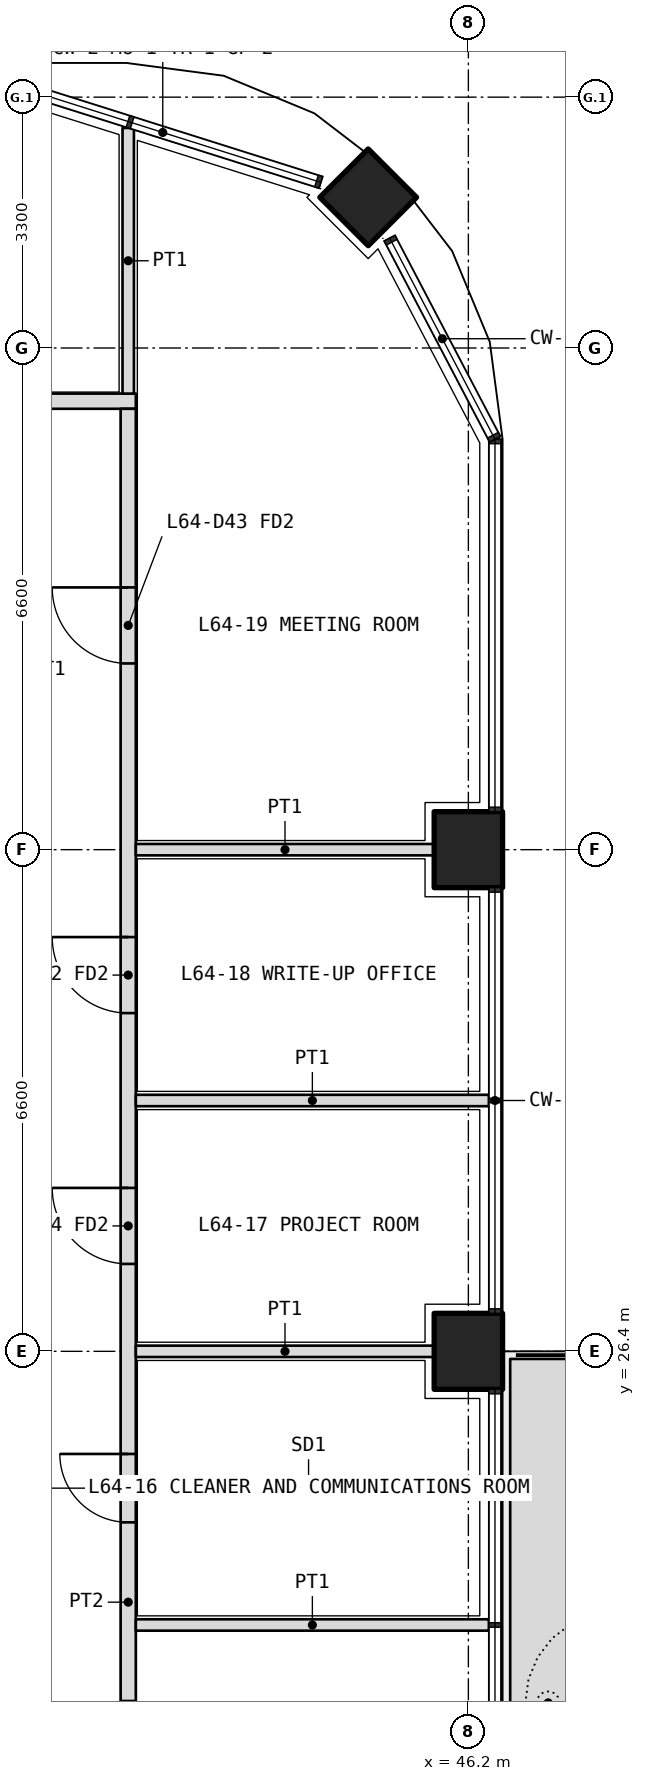
"""IFC4 building model, lengths in metres.
Left out: names, types, materials, properties, quantities, classifications, styles, units other than length and angle.
Written with IfcOpenShell. Run it as: python <this file> out.ifc"""

import sys

from ifc_helpers import new_model, si_unit, direction, frame, frame_2d, origin, origin_2d, place, context, subcontext, project, spatial, polyline, rectangle, outline, extrude, element, fill, save


model = new_model("IFC4")
c1 = context("Model", 3, precision=1e-05, world=origin(), true_north=direction((0.0, 1.0)))
c2 = subcontext(c1, "Body", "Model", "MODEL_VIEW")
j1 = project(units=[si_unit("LENGTHUNIT", "METRE"), si_unit("PLANEANGLEUNIT", "RADIAN")], contexts=[c1])
p1 = place(None, origin())
s1 = spatial("IfcSite", under=j1, at=p1, CompositionType="ELEMENT")
p2 = place(p1, origin())
s2 = spatial("IfcBuilding", under=s1, at=p2, CompositionType="ELEMENT")
p3 = place(p2, frame((0.0, 0.0, 279.6)))
s3 = spatial("IfcBuildingStorey", under=s2, at=p3, CompositionType="ELEMENT", Elevation=279.6)
p4 = place(p3, frame((44.882, 41.582, 0.0), z_axis=(0.0, 0.0, 1.0), x_axis=(0.707106781187, 0.707106781187, 0.0)))
e1 = element("IfcColumn", 1, at=p4, inside=s3, PredefinedType="COLUMN", context=c2, shape_type="SweptSolid", body=[
    extrude(rectangle(XDim=0.9, YDim=0.9, at=origin_2d()), origin(), (0.0, 0.0, 1.0), 4.2),
])
for number, where, z_axis, x_axis in (
    (2, (46.2, 26.4, 0.0), (0.0, 0.0, 1.0), (0.0, 1.0, 0.0)),
    (3, (46.2, 33.0, 0.0), (0.0, 0.0, 1.0), (0.0, 1.0, 0.0)),
):
    element("IfcColumn", number, at=place(p3, frame(where, z_axis=z_axis, x_axis=x_axis)), inside=s3, PredefinedType="COLUMN", context=c2, shape_type="SweptSolid", body=[
        extrude(rectangle(XDim=1.0, YDim=0.9, at=origin_2d()), origin(), (0.0, 0.0, 1.0), 4.2),
    ])
p5 = place(p3, origin())
e4 = element("IfcWall", 4, at=p5, inside=s3, PredefinedType="USERDEFINED", context=c2, shape_type="SweptSolid", body=[
    extrude(outline(polyline([(46.75, 17.25), (47.75, 17.25), (47.75, 26.3), (46.75, 26.3), (46.75, 17.25)]), holes=[polyline([(46.9, 17.4), (47.6, 17.4), (47.6, 26.15), (46.9, 26.15), (46.9, 17.4)])]), origin(), (0.0, 0.0, 1.0), 1.05),
])
p6 = place(p3, frame((10.975, 38.9, 0.0), z_axis=(0.0, 0.0, 1.0), x_axis=(1.0, 0.0, 0.0)))
e5 = element("IfcWall", 5, at=p6, inside=s3, PredefinedType="PARTITIONING", context=c2, shape_type="SweptSolid", body=[
    extrude(rectangle(XDim=30.85, YDim=0.2, at=frame_2d((15.425, 0.0))), origin(), (0.0, 0.0, 1.0), 3.0),
])
p7 = place(p6, frame((2.312, 0.0, 0.0)))
e6 = element("IfcOpeningElement", 6, at=p7, cuts=e5, PredefinedType="OPENING", context=c2, shape_type="SweptSolid", body=[
    extrude(rectangle(XDim=1.0, YDim=2.1, at=frame_2d((0.5, 1.05))), frame((0.0, 0.11, 0.0), z_axis=(0.0, -1.0, 0.0), x_axis=(1.0, 0.0, 0.0)), (0.0, 0.0, 1.0), 0.22),
])
p8 = place(p6, frame((7.125, 0.0, 0.0)))
e7 = element("IfcOpeningElement", 7, at=p8, cuts=e5, PredefinedType="OPENING", context=c2, shape_type="SweptSolid", body=[
    extrude(rectangle(XDim=1.0, YDim=2.1, at=frame_2d((0.5, 1.05))), frame((0.0, 0.11, 0.0), z_axis=(0.0, -1.0, 0.0), x_axis=(1.0, 0.0, 0.0)), (0.0, 0.0, 1.0), 0.22),
])
p9 = place(p6, frame((10.425, 0.0, 0.0)))
e8 = element("IfcOpeningElement", 8, at=p9, cuts=e5, PredefinedType="OPENING", context=c2, shape_type="SweptSolid", body=[
    extrude(rectangle(XDim=1.0, YDim=2.1, at=frame_2d((0.5, 1.05))), frame((0.0, 0.11, 0.0), z_axis=(0.0, -1.0, 0.0), x_axis=(1.0, 0.0, 0.0)), (0.0, 0.0, 1.0), 0.22),
])
p10 = place(p6, frame((13.275, 0.0, 0.0)))
e9 = element("IfcOpeningElement", 9, at=p10, cuts=e5, PredefinedType="OPENING", context=c2, shape_type="SweptSolid", body=[
    extrude(rectangle(XDim=1.0, YDim=2.1, at=frame_2d((0.5, 1.05))), frame((0.0, 0.11, 0.0), z_axis=(0.0, -1.0, 0.0), x_axis=(1.0, 0.0, 0.0)), (0.0, 0.0, 1.0), 0.22),
])
p11 = place(p6, frame((22.587, 0.0, 0.0)))
e10 = element("IfcOpeningElement", 10, at=p11, cuts=e5, PredefinedType="OPENING", context=c2, shape_type="SweptSolid", body=[
    extrude(rectangle(XDim=1.0, YDim=2.1, at=frame_2d((0.5, 1.05))), frame((0.0, 0.11, 0.0), z_axis=(0.0, -1.0, 0.0), x_axis=(1.0, 0.0, 0.0)), (0.0, 0.0, 1.0), 0.22),
])
p12 = place(p3, frame((41.725, 7.4, 0.0), z_axis=(0.0, 0.0, 1.0), x_axis=(0.0, 1.0, 0.0)))
e11 = element("IfcWall", 11, at=p12, inside=s3, PredefinedType="PARTITIONING", context=c2, shape_type="SweptSolid", body=[
    extrude(rectangle(XDim=31.4, YDim=0.2, at=frame_2d((15.7, 0.0))), origin(), (0.0, 0.0, 1.0), 3.0),
])
p13 = place(p12, frame((3.9, 0.0, 0.0)))
e12 = element("IfcOpeningElement", 12, at=p13, cuts=e11, PredefinedType="OPENING", context=c2, shape_type="SweptSolid", body=[
    extrude(rectangle(XDim=1.2, YDim=2.1, at=frame_2d((0.6, 1.05))), frame((0.0, 0.11, 0.0), z_axis=(0.0, -1.0, 0.0), x_axis=(1.0, 0.0, 0.0)), (0.0, 0.0, 1.0), 0.22),
])
p14 = place(p12, frame((10.25, 0.0, 0.0)))
e13 = element("IfcOpeningElement", 13, at=p14, cuts=e11, PredefinedType="OPENING", context=c2, shape_type="SweptSolid", body=[
    extrude(rectangle(XDim=1.0, YDim=2.1, at=frame_2d((0.5, 1.05))), frame((0.0, 0.11, 0.0), z_axis=(0.0, -1.0, 0.0), x_axis=(1.0, 0.0, 0.0)), (0.0, 0.0, 1.0), 0.22),
])
p15 = place(p12, frame((13.4, 0.0, 0.0)))
e14 = element("IfcOpeningElement", 14, at=p15, cuts=e11, PredefinedType="OPENING", context=c2, shape_type="SweptSolid", body=[
    extrude(rectangle(XDim=1.0, YDim=2.1, at=frame_2d((0.5, 1.05))), frame((0.0, 0.11, 0.0), z_axis=(0.0, -1.0, 0.0), x_axis=(1.0, 0.0, 0.0)), (0.0, 0.0, 1.0), 0.22),
])
p16 = place(p12, frame((16.75, 0.0, 0.0)))
e15 = element("IfcOpeningElement", 15, at=p16, cuts=e11, PredefinedType="OPENING", context=c2, shape_type="SweptSolid", body=[
    extrude(rectangle(XDim=0.9, YDim=2.1, at=frame_2d((0.45, 1.05))), frame((0.0, 0.11, 0.0), z_axis=(0.0, -1.0, 0.0), x_axis=(1.0, 0.0, 0.0)), (0.0, 0.0, 1.0), 0.22),
])
p17 = place(p12, frame((20.15, 0.0, 0.0)))
e16 = element("IfcOpeningElement", 16, at=p17, cuts=e11, PredefinedType="OPENING", context=c2, shape_type="SweptSolid", body=[
    extrude(rectangle(XDim=1.0, YDim=2.1, at=frame_2d((0.5, 1.05))), frame((0.0, 0.11, 0.0), z_axis=(0.0, -1.0, 0.0), x_axis=(1.0, 0.0, 0.0)), (0.0, 0.0, 1.0), 0.22),
])
p18 = place(p12, frame((23.45, 0.0, 0.0)))
e17 = element("IfcOpeningElement", 17, at=p18, cuts=e11, PredefinedType="OPENING", context=c2, shape_type="SweptSolid", body=[
    extrude(rectangle(XDim=1.0, YDim=2.1, at=frame_2d((0.5, 1.05))), frame((0.0, 0.11, 0.0), z_axis=(0.0, -1.0, 0.0), x_axis=(1.0, 0.0, 0.0)), (0.0, 0.0, 1.0), 0.22),
])
p19 = place(p12, frame((28.05, 0.0, 0.0)))
e18 = element("IfcOpeningElement", 18, at=p19, cuts=e11, PredefinedType="OPENING", context=c2, shape_type="SweptSolid", body=[
    extrude(rectangle(XDim=1.0, YDim=2.1, at=frame_2d((0.5, 1.05))), frame((0.0, 0.11, 0.0), z_axis=(0.0, -1.0, 0.0), x_axis=(1.0, 0.0, 0.0)), (0.0, 0.0, 1.0), 0.22),
])
p20 = place(p3, frame((41.725, 42.495, 0.0), z_axis=(0.0, 0.0, 1.0), x_axis=(0.0, -1.0, 0.0)))
e19 = element("IfcWall", 19, at=p20, inside=s3, PredefinedType="PARTITIONING", context=c2, shape_type="SweptSolid", body=[
    extrude(rectangle(XDim=3.495, YDim=0.15, at=frame_2d((1.748, 0.0))), origin(), (0.0, 0.0, 1.0), 2.7),
])
p21 = place(p3, frame((46.47, 22.8, 0.0), z_axis=(0.0, 0.0, 1.0), x_axis=(-1.0, 0.0, 0.0)))
e20 = element("IfcWall", 20, at=p21, inside=s3, PredefinedType="PARTITIONING", context=c2, shape_type="SweptSolid", body=[
    extrude(rectangle(XDim=4.645, YDim=0.15, at=frame_2d((2.323, 0.0))), origin(), (0.0, 0.0, 1.0), 2.7),
])
p22 = place(p3, frame((45.75, 26.4, 0.0), z_axis=(0.0, 0.0, 1.0), x_axis=(-1.0, 0.0, 0.0)))
e21 = element("IfcWall", 21, at=p22, inside=s3, PredefinedType="PARTITIONING", context=c2, shape_type="SweptSolid", body=[
    extrude(rectangle(XDim=3.925, YDim=0.15, at=frame_2d((1.962, 0.0))), origin(), (0.0, 0.0, 1.0), 3.0),
])
p23 = place(p3, frame((46.47, 29.7, 0.0), z_axis=(0.0, 0.0, 1.0), x_axis=(-1.0, 0.0, 0.0)))
e22 = element("IfcWall", 22, at=p23, inside=s3, PredefinedType="PARTITIONING", context=c2, shape_type="SweptSolid", body=[
    extrude(rectangle(XDim=4.645, YDim=0.15, at=frame_2d((2.323, 0.0))), origin(), (0.0, 0.0, 1.0), 2.7),
])
p24 = place(p3, frame((45.75, 33.0, 0.0), z_axis=(0.0, 0.0, 1.0), x_axis=(-1.0, 0.0, 0.0)))
e23 = element("IfcWall", 23, at=p24, inside=s3, PredefinedType="PARTITIONING", context=c2, shape_type="SweptSolid", body=[
    extrude(rectangle(XDim=3.925, YDim=0.15, at=frame_2d((1.962, 0.0))), origin(), (0.0, 0.0, 1.0), 3.0),
])
p25 = place(p16, origin())
e24 = element("IfcDoor", 24, at=p25, inside=s3, OperationType="SINGLE_SWING_RIGHT", PredefinedType="DOOR", context=c2, shape_type="SweptSolid", body=[
    extrude(rectangle(XDim=0.9, YDim=2.1, at=frame_2d((0.45, 1.05))), frame((0.0, 0.025, 0.0), z_axis=(0.0, -1.0, 0.0), x_axis=(1.0, 0.0, 0.0)), (0.0, 0.0, 1.0), 0.05),
])
fill(e15, e24)
p26 = place(p17, origin())
e25 = element("IfcDoor", 25, at=p26, inside=s3, OperationType="SINGLE_SWING_RIGHT", PredefinedType="DOOR", context=c2, shape_type="SweptSolid", body=[
    extrude(rectangle(XDim=1.0, YDim=2.1, at=frame_2d((0.5, 1.05))), frame((0.0, 0.025, 0.0), z_axis=(0.0, -1.0, 0.0), x_axis=(1.0, 0.0, 0.0)), (0.0, 0.0, 1.0), 0.05),
])
fill(e16, e25)
p27 = place(p18, origin())
e26 = element("IfcDoor", 26, at=p27, inside=s3, OperationType="SINGLE_SWING_RIGHT", PredefinedType="DOOR", context=c2, shape_type="SweptSolid", body=[
    extrude(rectangle(XDim=1.0, YDim=2.1, at=frame_2d((0.5, 1.05))), frame((0.0, 0.025, 0.0), z_axis=(0.0, -1.0, 0.0), x_axis=(1.0, 0.0, 0.0)), (0.0, 0.0, 1.0), 0.05),
])
fill(e17, e26)
p28 = place(p19, origin())
e27 = element("IfcDoor", 27, at=p28, inside=s3, OperationType="SINGLE_SWING_RIGHT", PredefinedType="DOOR", context=c2, shape_type="SweptSolid", body=[
    extrude(rectangle(XDim=1.0, YDim=2.1, at=frame_2d((0.5, 1.05))), frame((0.0, 0.025, 0.0), z_axis=(0.0, -1.0, 0.0), x_axis=(1.0, 0.0, 0.0)), (0.0, 0.0, 1.0), 0.05),
])
fill(e18, e27)
save(model, sys.argv[1])
